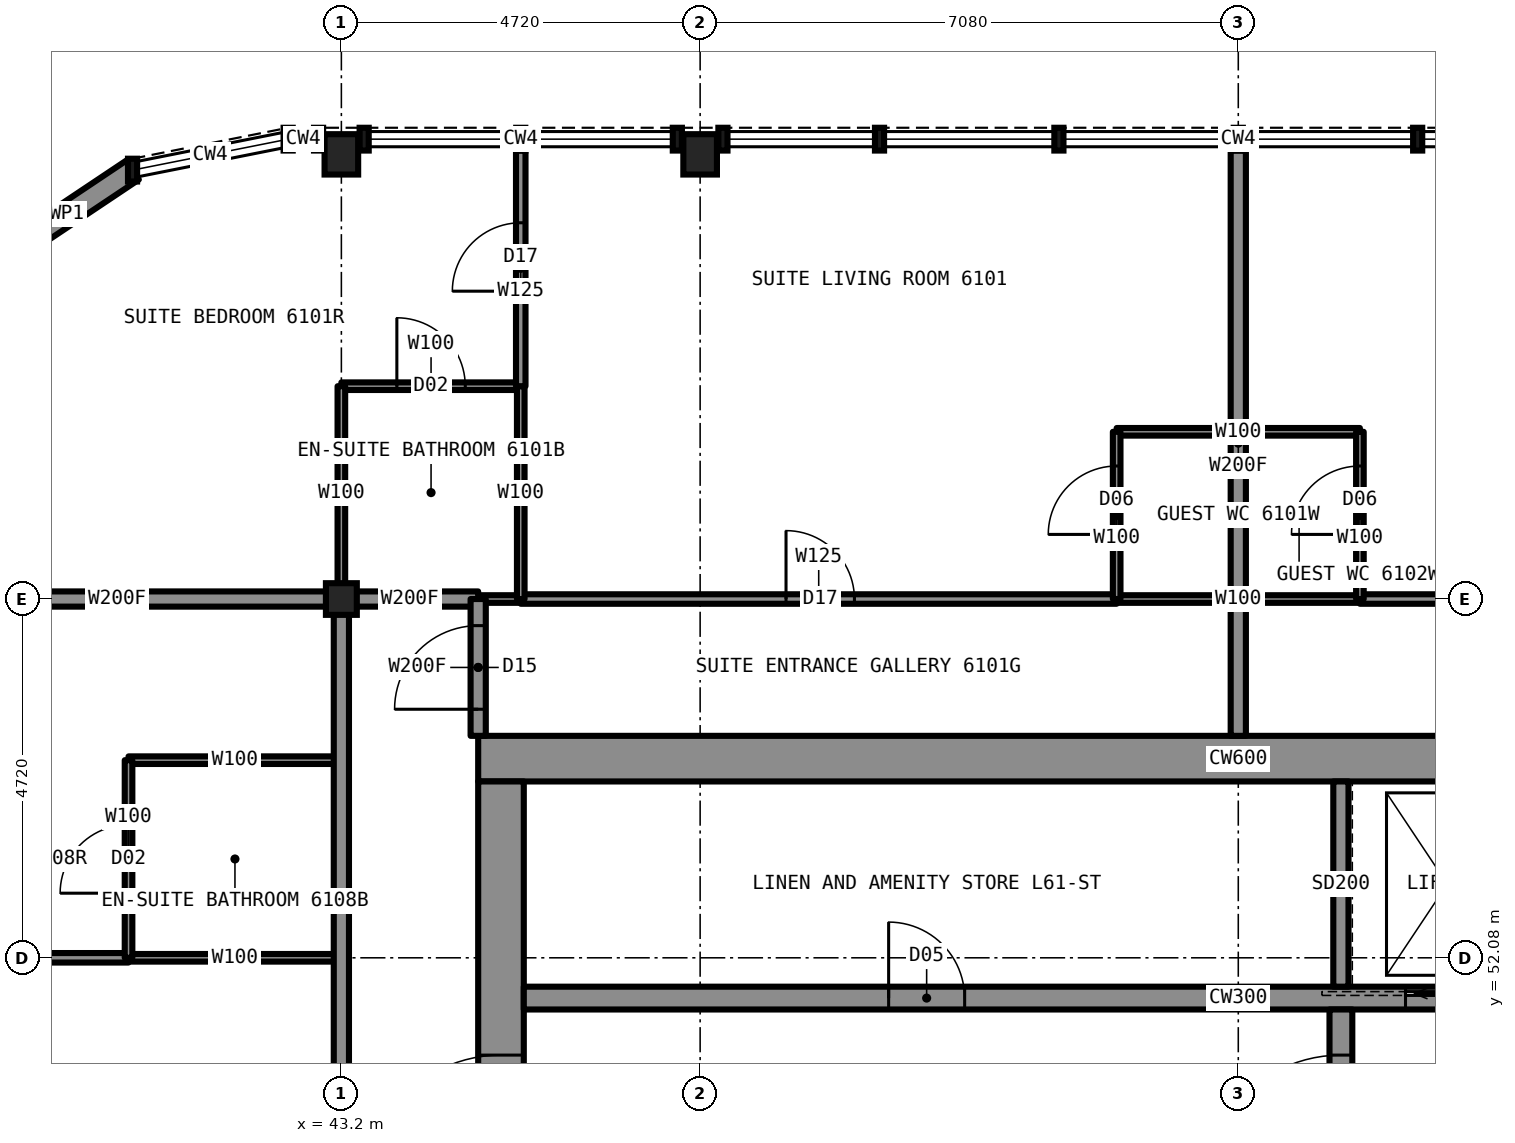
"""IFC4 building model, lengths in metres.
Left out: names, types, materials, properties, quantities, classifications, styles, units other than length and angle.
Written with IfcOpenShell. Run it as: python <this file> out.ifc"""

import sys

from ifc_helpers import new_model, si_unit, direction, frame, frame_2d, origin, origin_2d, place, context, subcontext, project, spatial, rectangle, i_section, extrude, element, fill, save


model = new_model("IFC4")
c1 = context("Model", 3, precision=1e-05, world=origin(), true_north=direction((0.0, 1.0)))
c2 = subcontext(c1, "Body", "Model", "MODEL_VIEW")
j1 = project(units=[si_unit("LENGTHUNIT", "METRE"), si_unit("PLANEANGLEUNIT", "RADIAN")], contexts=[c1])
p1 = place(None, origin())
s1 = spatial("IfcSite", under=j1, at=p1, CompositionType="ELEMENT")
p2 = place(p1, origin())
s2 = spatial("IfcBuilding", under=s1, at=p2, CompositionType="ELEMENT")
p3 = place(p2, frame((0.0, 0.0, 226.7)))
s3 = spatial("IfcBuildingStorey", under=s2, at=p3, CompositionType="ELEMENT", Elevation=226.7)
for number, where, z_axis, x_axis in (
    (1, (43.2, 62.65, 0.0), (0.0, 0.0, 1.0), (1.0, 0.0, 0.0)),
    (2, (47.92, 62.65, 0.0), (0.0, 0.0, 1.0), (1.0, 0.0, 0.0)),
):
    element("IfcColumn", number, at=place(p3, frame(where, z_axis=z_axis, x_axis=x_axis)), inside=s3, PredefinedType="COLUMN", context=c2, shape_type="SweptSolid", body=[
        extrude(i_section(OverallWidth=0.442, OverallDepth=0.531, WebThickness=0.066, FlangeThickness=0.106, at=origin_2d()), origin(), (0.0, 0.0, 1.0), 3.5),
    ])
p4 = place(p3, frame((43.2, 56.8, 0.0), z_axis=(0.0, 0.0, 1.0), x_axis=(1.0, 0.0, 0.0)))
e3 = element("IfcColumn", 3, at=p4, inside=s3, PredefinedType="COLUMN", context=c2, shape_type="SweptSolid", body=[
    extrude(i_section(OverallWidth=0.406, OverallDepth=0.417, WebThickness=0.03, FlangeThickness=0.048, at=origin_2d()), origin(), (0.0, 0.0, 1.0), 3.5),
])
p5 = place(p3, frame((45.0, 54.7, 0.0), z_axis=(0.0, 0.0, 1.0), x_axis=(1.0, 0.0, 0.0)))
e4 = element("IfcWall", 4, at=p5, inside=s3, PredefinedType="SHEAR", context=c2, shape_type="SweptSolid", body=[
    extrude(rectangle(XDim=20.0, YDim=0.6, at=frame_2d((10.0, 0.0))), origin(), (0.0, 0.0, 1.0), 3.5),
])
p6 = place(p3, frame((45.3, 35.6, 0.0), z_axis=(0.0, 0.0, 1.0), x_axis=(0.0, 1.0, 0.0)))
e5 = element("IfcWall", 5, at=p6, inside=s3, PredefinedType="SHEAR", context=c2, shape_type="SweptSolid", body=[
    extrude(rectangle(XDim=18.8, YDim=0.6, at=frame_2d((9.4, 0.0))), origin(), (0.0, 0.0, 1.0), 3.5),
])
p7 = place(p6, frame((13.4, 0.0, 0.0)))
e6 = element("IfcOpeningElement", 6, at=p7, cuts=e5, PredefinedType="OPENING", context=c2, shape_type="SweptSolid", body=[
    extrude(rectangle(XDim=1.8, YDim=2.2, at=frame_2d((0.9, 1.1))), frame((0.0, 0.31, 0.0), z_axis=(0.0, -1.0, 0.0), x_axis=(1.0, 0.0, 0.0)), (0.0, 0.0, 1.0), 0.62),
])
p8 = place(p6, frame((3.6, 0.0, 0.0)))
e7 = element("IfcOpeningElement", 7, at=p8, cuts=e5, PredefinedType="OPENING", context=c2, shape_type="SweptSolid", body=[
    extrude(rectangle(XDim=1.8, YDim=2.2, at=frame_2d((0.9, 1.1))), frame((0.0, 0.31, 0.0), z_axis=(0.0, -1.0, 0.0), x_axis=(1.0, 0.0, 0.0)), (0.0, 0.0, 1.0), 0.62),
])
p9 = place(p6, frame((6.4, 0.0, 0.0)))
e8 = element("IfcOpeningElement", 8, at=p9, cuts=e5, PredefinedType="OPENING", context=c2, shape_type="SweptSolid", body=[
    extrude(rectangle(XDim=1.2, YDim=2.2, at=frame_2d((0.6, 1.1))), frame((0.0, 0.31, 0.0), z_axis=(0.0, -1.0, 0.0), x_axis=(1.0, 0.0, 0.0)), (0.0, 0.0, 1.0), 0.62),
])
p10 = place(p3, frame((45.6, 51.55, 0.0), z_axis=(0.0, 0.0, 1.0), x_axis=(1.0, 0.0, 0.0)))
e9 = element("IfcWall", 9, at=p10, inside=s3, PredefinedType="SHEAR", context=c2, shape_type="SweptSolid", body=[
    extrude(rectangle(XDim=18.8, YDim=0.3, at=frame_2d((9.4, 0.0))), origin(), (0.0, 0.0, 1.0), 3.5),
])
p11 = place(p10, frame((4.8, 0.0, 0.0)))
e10 = element("IfcOpeningElement", 10, at=p11, cuts=e9, PredefinedType="OPENING", context=c2, shape_type="SweptSolid", body=[
    extrude(rectangle(XDim=1.0, YDim=2.1, at=frame_2d((0.5, 1.05))), frame((0.0, 0.16, 0.0), z_axis=(0.0, -1.0, 0.0), x_axis=(1.0, 0.0, 0.0)), (0.0, 0.0, 1.0), 0.32),
])
p12 = place(p10, frame((11.6, 0.0, 0.0)))
e11 = element("IfcOpeningElement", 11, at=p12, cuts=e9, PredefinedType="OPENING", context=c2, shape_type="SweptSolid", body=[
    extrude(rectangle(XDim=1.1, YDim=2.2, at=frame_2d((0.55, 1.1))), frame((0.0, 0.16, 0.0), z_axis=(0.0, -1.0, 0.0), x_axis=(1.0, 0.0, 0.0)), (0.0, 0.0, 1.0), 0.32),
])
p13 = place(p10, frame((14.3, 0.0, 0.0)))
e12 = element("IfcOpeningElement", 12, at=p13, cuts=e9, PredefinedType="OPENING", context=c2, shape_type="SweptSolid", body=[
    extrude(rectangle(XDim=1.1, YDim=2.2, at=frame_2d((0.55, 1.1))), frame((0.0, 0.16, 0.0), z_axis=(0.0, -1.0, 0.0), x_axis=(1.0, 0.0, 0.0)), (0.0, 0.0, 1.0), 0.32),
])
p14 = place(p3, frame((56.35, 41.9, 0.0), z_axis=(0.0, 0.0, 1.0), x_axis=(0.0, 1.0, 0.0)))
e13 = element("IfcWall", 13, at=p14, inside=s3, PredefinedType="SHEAR", context=c2, shape_type="SweptSolid", body=[
    extrude(rectangle(XDim=9.5, YDim=0.3, at=frame_2d((4.75, 0.0))), origin(), (0.0, 0.0, 1.0), 3.5),
])
p15 = place(p14, frame((7.1, 0.0, 0.0)))
e14 = element("IfcOpeningElement", 14, at=p15, cuts=e13, PredefinedType="OPENING", context=c2, shape_type="SweptSolid", body=[
    extrude(rectangle(XDim=1.8, YDim=2.2, at=frame_2d((0.9, 1.1))), frame((0.0, 0.16, 0.0), z_axis=(0.0, -1.0, 0.0), x_axis=(1.0, 0.0, 0.0)), (0.0, 0.0, 1.0), 0.32),
])
p16 = place(p3, frame((45.0, 56.8, 0.0), z_axis=(0.0, 0.0, 1.0), x_axis=(1.0, 0.0, 0.0)))
e15 = element("IfcWall", 15, at=p16, inside=s3, PredefinedType="PARTITIONING", context=c2, shape_type="SweptSolid", body=[
    extrude(rectangle(XDim=0.56, YDim=0.1, at=frame_2d((0.28, 0.0))), origin(), (0.0, 0.0, 1.0), 3.33),
])
p17 = place(p3, frame((53.4, 56.8, 0.0), z_axis=(0.0, 0.0, 1.0), x_axis=(1.0, 0.0, 0.0)))
e16 = element("IfcWall", 16, at=p17, inside=s3, PredefinedType="PARTITIONING", context=c2, shape_type="SweptSolid", body=[
    extrude(rectangle(XDim=3.2, YDim=0.1, at=frame_2d((1.6, 0.0))), origin(), (0.0, 0.0, 1.0), 3.33),
])
p18 = place(p3, frame((43.2, 56.8, 0.0), z_axis=(0.0, 0.0, 1.0), x_axis=(1.0, 0.0, 0.0)))
e17 = element("IfcWall", 17, at=p18, inside=s3, PredefinedType="PARTITIONING", context=c2, shape_type="SweptSolid", body=[
    extrude(rectangle(XDim=1.8, YDim=0.2, at=frame_2d((0.9, 0.0))), origin(), (0.0, 0.0, 1.0), 3.33),
])
p19 = place(p3, frame((37.3, 56.8, 0.0), z_axis=(0.0, 0.0, 1.0), x_axis=(1.0, 0.0, 0.0)))
e18 = element("IfcWall", 18, at=p19, inside=s3, PredefinedType="PARTITIONING", context=c2, shape_type="SweptSolid", body=[
    extrude(rectangle(XDim=5.9, YDim=0.2, at=frame_2d((2.95, 0.0))), origin(), (0.0, 0.0, 1.0), 2.573),
])
p20 = place(p3, frame((45.56, 56.8, 0.0), z_axis=(0.0, 0.0, 1.0), x_axis=(1.0, 0.0, 0.0)))
e19 = element("IfcWall", 19, at=p20, inside=s3, PredefinedType="PARTITIONING", context=c2, shape_type="SweptSolid", body=[
    extrude(rectangle(XDim=7.84, YDim=0.125, at=frame_2d((3.92, 0.0))), origin(), (0.0, 0.0, 1.0), 3.33),
])
p21 = place(p20, frame((3.49, 0.0, 0.0)))
e20 = element("IfcOpeningElement", 20, at=p21, cuts=e19, PredefinedType="OPENING", context=c2, shape_type="SweptSolid", body=[
    extrude(rectangle(XDim=0.9, YDim=2.2, at=frame_2d((0.45, 1.1))), frame((0.0, 0.073, 0.0), z_axis=(0.0, -1.0, 0.0), x_axis=(1.0, 0.0, 0.0)), (0.0, 0.0, 1.0), 0.145),
])
p22 = place(p3, frame((56.6, 56.8, 0.0), z_axis=(0.0, 0.0, 1.0), x_axis=(1.0, 0.0, 0.0)))
e21 = element("IfcWall", 21, at=p22, inside=s3, PredefinedType="PARTITIONING", context=c2, shape_type="SweptSolid", body=[
    extrude(rectangle(XDim=7.84, YDim=0.125, at=frame_2d((3.92, 0.0))), origin(), (0.0, 0.0, 1.0), 3.33),
])
p23 = place(p22, frame((3.45, 0.0, 0.0)))
e22 = element("IfcOpeningElement", 22, at=p23, cuts=e21, PredefinedType="OPENING", context=c2, shape_type="SweptSolid", body=[
    extrude(rectangle(XDim=0.9, YDim=2.2, at=frame_2d((0.45, 1.1))), frame((0.0, 0.073, 0.0), z_axis=(0.0, -1.0, 0.0), x_axis=(1.0, 0.0, 0.0)), (0.0, 0.0, 1.0), 0.145),
])
p24 = place(p3, frame((53.4, 59.0, 0.0), z_axis=(0.0, 0.0, 1.0), x_axis=(1.0, 0.0, 0.0)))
e23 = element("IfcWall", 23, at=p24, inside=s3, PredefinedType="PARTITIONING", context=c2, shape_type="SweptSolid", body=[
    extrude(rectangle(XDim=3.2, YDim=0.1, at=frame_2d((1.6, 0.0))), origin(), (0.0, 0.0, 1.0), 3.33),
])
p25 = place(p3, frame((43.2, 59.6, 0.0), z_axis=(0.0, 0.0, 1.0), x_axis=(1.0, 0.0, 0.0)))
e24 = element("IfcWall", 24, at=p25, inside=s3, PredefinedType="PARTITIONING", context=c2, shape_type="SweptSolid", body=[
    extrude(rectangle(XDim=2.36, YDim=0.1, at=frame_2d((1.18, 0.0))), origin(), (0.0, 0.0, 1.0), 3.33),
])
p26 = place(p25, frame((0.73, 0.0, 0.0)))
e25 = element("IfcOpeningElement", 25, at=p26, cuts=e24, PredefinedType="OPENING", context=c2, shape_type="SweptSolid", body=[
    extrude(rectangle(XDim=0.9, YDim=2.1, at=frame_2d((0.45, 1.05))), frame((0.0, 0.06, 0.0), z_axis=(0.0, -1.0, 0.0), x_axis=(1.0, 0.0, 0.0)), (0.0, 0.0, 1.0), 0.12),
])
p27 = place(p3, frame((40.4, 52.08, 0.0), z_axis=(0.0, 0.0, 1.0), x_axis=(1.0, 0.0, 0.0)))
e26 = element("IfcWall", 26, at=p27, inside=s3, PredefinedType="PARTITIONING", context=c2, shape_type="SweptSolid", body=[
    extrude(rectangle(XDim=2.8, YDim=0.1, at=frame_2d((1.4, 0.0))), origin(), (0.0, 0.0, 1.0), 2.573),
])
p28 = place(p3, frame((37.3, 52.08, 0.0), z_axis=(0.0, 0.0, 1.0), x_axis=(1.0, 0.0, 0.0)))
e27 = element("IfcWall", 27, at=p28, inside=s3, PredefinedType="PARTITIONING", context=c2, shape_type="SweptSolid", body=[
    extrude(rectangle(XDim=3.1, YDim=0.125, at=frame_2d((1.55, 0.0))), origin(), (0.0, 0.0, 1.0), 2.573),
])
p29 = place(p28, frame((0.95, 0.0, 0.0)))
e28 = element("IfcOpeningElement", 28, at=p29, cuts=e27, PredefinedType="OPENING", context=c2, shape_type="SweptSolid", body=[
    extrude(rectangle(XDim=0.9, YDim=2.2, at=frame_2d((0.45, 1.1))), frame((0.0, 0.073, 0.0), z_axis=(0.0, -1.0, 0.0), x_axis=(1.0, 0.0, 0.0)), (0.0, 0.0, 1.0), 0.145),
])
p30 = place(p3, frame((40.4, 54.68, 0.0), z_axis=(0.0, 0.0, 1.0), x_axis=(1.0, 0.0, 0.0)))
e29 = element("IfcWall", 29, at=p30, inside=s3, PredefinedType="PARTITIONING", context=c2, shape_type="SweptSolid", body=[
    extrude(rectangle(XDim=2.8, YDim=0.1, at=frame_2d((1.4, 0.0))), origin(), (0.0, 0.0, 1.0), 3.33),
])
p31 = place(p3, frame((53.4, 56.8, 0.0), z_axis=(0.0, 0.0, 1.0), x_axis=(0.0, 1.0, 0.0)))
e30 = element("IfcWall", 30, at=p31, inside=s3, PredefinedType="PARTITIONING", context=c2, shape_type="SweptSolid", body=[
    extrude(rectangle(XDim=2.2, YDim=0.1, at=frame_2d((1.1, 0.0))), origin(), (0.0, 0.0, 1.0), 3.33),
])
p32 = place(p31, frame((0.85, 0.0, 0.0)))
e31 = element("IfcOpeningElement", 31, at=p32, cuts=e30, PredefinedType="OPENING", context=c2, shape_type="SweptSolid", body=[
    extrude(rectangle(XDim=0.9, YDim=2.1, at=frame_2d((0.45, 1.05))), frame((0.0, 0.06, 0.0), z_axis=(0.0, -1.0, 0.0), x_axis=(1.0, 0.0, 0.0)), (0.0, 0.0, 1.0), 0.12),
])
p33 = place(p3, frame((45.0, 55.0, 0.0), z_axis=(0.0, 0.0, 1.0), x_axis=(0.0, 1.0, 0.0)))
e32 = element("IfcWall", 32, at=p33, inside=s3, PredefinedType="PARTITIONING", context=c2, shape_type="SweptSolid", body=[
    extrude(rectangle(XDim=1.8, YDim=0.2, at=frame_2d((0.9, 0.0))), origin(), (0.0, 0.0, 1.0), 3.33),
])
p34 = place(p33, frame((0.35, 0.0, 0.0)))
e33 = element("IfcOpeningElement", 33, at=p34, cuts=e32, PredefinedType="OPENING", context=c2, shape_type="SweptSolid", body=[
    extrude(rectangle(XDim=1.1, YDim=2.2, at=frame_2d((0.55, 1.1))), frame((0.0, 0.11, 0.0), z_axis=(0.0, -1.0, 0.0), x_axis=(1.0, 0.0, 0.0)), (0.0, 0.0, 1.0), 0.22),
])
p35 = place(p3, frame((43.2, 56.8, 0.0), z_axis=(0.0, 0.0, 1.0), x_axis=(0.0, 1.0, 0.0)))
e34 = element("IfcWall", 34, at=p35, inside=s3, PredefinedType="PARTITIONING", context=c2, shape_type="SweptSolid", body=[
    extrude(rectangle(XDim=2.8, YDim=0.1, at=frame_2d((1.4, 0.0))), origin(), (0.0, 0.0, 1.0), 2.573),
])
p36 = place(p3, frame((43.2, 33.2, 0.0), z_axis=(0.0, 0.0, 1.0), x_axis=(0.0, 1.0, 0.0)))
e35 = element("IfcWall", 35, at=p36, inside=s3, PredefinedType="PARTITIONING", context=c2, shape_type="SweptSolid", body=[
    extrude(rectangle(XDim=23.6, YDim=0.2, at=frame_2d((11.8, 0.0))), origin(), (0.0, 0.0, 1.0), 3.33),
])
p37 = place(p36, frame((8.85, 0.0, 0.0)))
e36 = element("IfcOpeningElement", 36, at=p37, cuts=e35, PredefinedType="OPENING", context=c2, shape_type="SweptSolid", body=[
    extrude(rectangle(XDim=1.1, YDim=2.2, at=frame_2d((0.55, 1.1))), frame((0.0, 0.11, 0.0), z_axis=(0.0, -1.0, 0.0), x_axis=(1.0, 0.0, 0.0)), (0.0, 0.0, 1.0), 0.22),
])
p38 = place(p36, frame((13.65, 0.0, 0.0)))
e37 = element("IfcOpeningElement", 37, at=p38, cuts=e35, PredefinedType="OPENING", context=c2, shape_type="SweptSolid", body=[
    extrude(rectangle(XDim=1.1, YDim=2.2, at=frame_2d((0.55, 1.1))), frame((0.0, 0.11, 0.0), z_axis=(0.0, -1.0, 0.0), x_axis=(1.0, 0.0, 0.0)), (0.0, 0.0, 1.0), 0.22),
])
p39 = place(p3, frame((40.4, 52.08, 0.0), z_axis=(0.0, 0.0, 1.0), x_axis=(0.0, 1.0, 0.0)))
e38 = element("IfcWall", 38, at=p39, inside=s3, PredefinedType="PARTITIONING", context=c2, shape_type="SweptSolid", body=[
    extrude(rectangle(XDim=2.6, YDim=0.1, at=frame_2d((1.3, 0.0))), origin(), (0.0, 0.0, 1.0), 3.33),
])
p40 = place(p39, frame((0.85, 0.0, 0.0)))
e39 = element("IfcOpeningElement", 39, at=p40, cuts=e38, PredefinedType="OPENING", context=c2, shape_type="SweptSolid", body=[
    extrude(rectangle(XDim=0.9, YDim=2.1, at=frame_2d((0.45, 1.05))), frame((0.0, 0.06, 0.0), z_axis=(0.0, -1.0, 0.0), x_axis=(1.0, 0.0, 0.0)), (0.0, 0.0, 1.0), 0.12),
])
p41 = place(p3, frame((45.56, 56.8, 0.0), z_axis=(0.0, 0.0, 1.0), x_axis=(0.0, 1.0, 0.0)))
e40 = element("IfcWall", 40, at=p41, inside=s3, PredefinedType="PARTITIONING", context=c2, shape_type="SweptSolid", body=[
    extrude(rectangle(XDim=2.8, YDim=0.1, at=frame_2d((1.4, 0.0))), origin(), (0.0, 0.0, 1.0), 3.33),
])
p42 = place(p3, frame((45.56, 59.6, 0.0), z_axis=(0.0, 0.0, 1.0), x_axis=(0.0, 1.0, 0.0)))
e41 = element("IfcWall", 41, at=p42, inside=s3, PredefinedType="PARTITIONING", context=c2, shape_type="SweptSolid", body=[
    extrude(rectangle(XDim=3.1, YDim=0.125, at=frame_2d((1.55, 0.0))), origin(), (0.0, 0.0, 1.0), 3.33),
])
p43 = place(p42, frame((1.25, 0.0, 0.0)))
e42 = element("IfcOpeningElement", 42, at=p43, cuts=e41, PredefinedType="OPENING", context=c2, shape_type="SweptSolid", body=[
    extrude(rectangle(XDim=0.9, YDim=2.2, at=frame_2d((0.45, 1.1))), frame((0.0, 0.073, 0.0), z_axis=(0.0, -1.0, 0.0), x_axis=(1.0, 0.0, 0.0)), (0.0, 0.0, 1.0), 0.145),
])
p44 = place(p3, frame((55.0, 55.0, 0.0), z_axis=(0.0, 0.0, 1.0), x_axis=(0.0, 1.0, 0.0)))
e43 = element("IfcWall", 43, at=p44, inside=s3, PredefinedType="PARTITIONING", context=c2, shape_type="SweptSolid", body=[
    extrude(rectangle(XDim=7.7, YDim=0.2, at=frame_2d((3.85, 0.0))), origin(), (0.0, 0.0, 1.0), 2.573),
])
p45 = place(p3, frame((56.6, 56.8, 0.0), z_axis=(0.0, 0.0, 1.0), x_axis=(0.0, 1.0, 0.0)))
e44 = element("IfcWall", 44, at=p45, inside=s3, PredefinedType="PARTITIONING", context=c2, shape_type="SweptSolid", body=[
    extrude(rectangle(XDim=2.2, YDim=0.1, at=frame_2d((1.1, 0.0))), origin(), (0.0, 0.0, 1.0), 3.33),
])
p46 = place(p45, frame((0.85, 0.0, 0.0)))
e45 = element("IfcOpeningElement", 45, at=p46, cuts=e44, PredefinedType="OPENING", context=c2, shape_type="SweptSolid", body=[
    extrude(rectangle(XDim=0.9, YDim=2.1, at=frame_2d((0.45, 1.05))), frame((0.0, 0.06, 0.0), z_axis=(0.0, -1.0, 0.0), x_axis=(1.0, 0.0, 0.0)), (0.0, 0.0, 1.0), 0.12),
])
p47 = place(p3, frame((56.35, 51.7, 0.0), z_axis=(0.0, 0.0, 1.0), x_axis=(0.0, 1.0, 0.0)))
e46 = element("IfcWall", 46, at=p47, inside=s3, PredefinedType="PARTITIONING", context=c2, shape_type="SweptSolid", body=[
    extrude(rectangle(XDim=2.7, YDim=0.2, at=frame_2d((1.35, 0.0))), origin(), (0.0, 0.0, 1.0), 3.33),
])
p48 = place(p3, frame((40.453, 62.443, 0.0), z_axis=(0.0, 0.0, 1.0), x_axis=(-0.831420010345, -0.555644460423, 0.0)))
e47 = element("IfcWall", 47, at=p48, inside=s3, PredefinedType="SOLIDWALL", context=c2, shape_type="SweptSolid", body=[
    extrude(rectangle(XDim=2.087, YDim=0.3, at=frame_2d((1.044, 0.0))), origin(), (0.0, 0.0, 1.0), 2.83),
])
p49 = place(p21, origin())
e48 = element("IfcDoor", 48, at=p49, inside=s3, OperationType="SINGLE_SWING_LEFT", PredefinedType="DOOR", context=c2, shape_type="SweptSolid", body=[
    extrude(rectangle(XDim=0.9, YDim=2.2, at=frame_2d((0.45, 1.1))), frame((0.0, 0.025, 0.0), z_axis=(0.0, -1.0, 0.0), x_axis=(1.0, 0.0, 0.0)), (0.0, 0.0, 1.0), 0.05),
])
fill(e20, e48)
p50 = place(p26, origin())
e49 = element("IfcDoor", 49, at=p50, inside=s3, OperationType="SINGLE_SWING_RIGHT", PredefinedType="DOOR", context=c2, shape_type="SweptSolid", body=[
    extrude(rectangle(XDim=0.9, YDim=2.1, at=frame_2d((0.45, 1.05))), frame((0.0, 0.025, 0.0), z_axis=(0.0, -1.0, 0.0), x_axis=(1.0, 0.0, 0.0)), (0.0, 0.0, 1.0), 0.05),
])
fill(e25, e49)
p51 = place(p34, origin())
e50 = element("IfcDoor", 50, at=p51, inside=s3, OperationType="SINGLE_SWING_LEFT", PredefinedType="DOOR", context=c2, shape_type="SweptSolid", body=[
    extrude(rectangle(XDim=1.1, YDim=2.2, at=frame_2d((0.55, 1.1))), frame((0.0, 0.025, 0.0), z_axis=(0.0, -1.0, 0.0), x_axis=(1.0, 0.0, 0.0)), (0.0, 0.0, 1.0), 0.05),
])
fill(e33, e50)
p52 = place(p43, origin())
e51 = element("IfcDoor", 51, at=p52, inside=s3, OperationType="SINGLE_SWING_LEFT", PredefinedType="DOOR", context=c2, shape_type="SweptSolid", body=[
    extrude(rectangle(XDim=0.9, YDim=2.2, at=frame_2d((0.45, 1.1))), frame((0.0, 0.025, 0.0), z_axis=(0.0, -1.0, 0.0), x_axis=(1.0, 0.0, 0.0)), (0.0, 0.0, 1.0), 0.05),
])
fill(e42, e51)
p53 = place(p32, origin())
e52 = element("IfcDoor", 52, at=p53, inside=s3, OperationType="SINGLE_SWING_LEFT", PredefinedType="DOOR", context=c2, shape_type="SweptSolid", body=[
    extrude(rectangle(XDim=0.9, YDim=2.1, at=frame_2d((0.45, 1.05))), frame((0.0, 0.025, 0.0), z_axis=(0.0, -1.0, 0.0), x_axis=(1.0, 0.0, 0.0)), (0.0, 0.0, 1.0), 0.05),
])
fill(e31, e52)
p54 = place(p46, origin())
e53 = element("IfcDoor", 53, at=p54, inside=s3, OperationType="SINGLE_SWING_LEFT", PredefinedType="DOOR", context=c2, shape_type="SweptSolid", body=[
    extrude(rectangle(XDim=0.9, YDim=2.1, at=frame_2d((0.45, 1.05))), frame((0.0, 0.025, 0.0), z_axis=(0.0, -1.0, 0.0), x_axis=(1.0, 0.0, 0.0)), (0.0, 0.0, 1.0), 0.05),
])
fill(e45, e53)
p55 = place(p40, origin())
e54 = element("IfcDoor", 54, at=p55, inside=s3, OperationType="SINGLE_SWING_RIGHT", PredefinedType="DOOR", context=c2, shape_type="SweptSolid", body=[
    extrude(rectangle(XDim=0.9, YDim=2.1, at=frame_2d((0.45, 1.05))), frame((0.0, 0.025, 0.0), z_axis=(0.0, -1.0, 0.0), x_axis=(1.0, 0.0, 0.0)), (0.0, 0.0, 1.0), 0.05),
])
fill(e39, e54)
p56 = place(p7, origin())
e55 = element("IfcDoor", 55, at=p56, inside=s3, OperationType="DOUBLE_DOOR_SINGLE_SWING", PredefinedType="DOOR", context=c2, shape_type="SweptSolid", body=[
    extrude(rectangle(XDim=1.8, YDim=2.2, at=frame_2d((0.9, 1.1))), frame((0.0, 0.025, 0.0), z_axis=(0.0, -1.0, 0.0), x_axis=(1.0, 0.0, 0.0)), (0.0, 0.0, 1.0), 0.05),
])
fill(e6, e55)
p57 = place(p15, origin())
e56 = element("IfcDoor", 56, at=p57, inside=s3, OperationType="DOUBLE_DOOR_SINGLE_SWING", PredefinedType="DOOR", context=c2, shape_type="SweptSolid", body=[
    extrude(rectangle(XDim=1.8, YDim=2.2, at=frame_2d((0.9, 1.1))), frame((0.0, 0.025, 0.0), z_axis=(0.0, -1.0, 0.0), x_axis=(1.0, 0.0, 0.0)), (0.0, 0.0, 1.0), 0.05),
])
fill(e14, e56)
p58 = place(p11, origin())
e57 = element("IfcDoor", 57, at=p58, inside=s3, OperationType="SINGLE_SWING_LEFT", PredefinedType="DOOR", context=c2, shape_type="SweptSolid", body=[
    extrude(rectangle(XDim=1.0, YDim=2.1, at=frame_2d((0.5, 1.05))), frame((0.0, 0.025, 0.0), z_axis=(0.0, -1.0, 0.0), x_axis=(1.0, 0.0, 0.0)), (0.0, 0.0, 1.0), 0.05),
])
fill(e10, e57)
p59 = place(p12, origin())
e58 = element("IfcDoor", 58, at=p59, inside=s3, OperationType="SLIDING_TO_LEFT", PredefinedType="DOOR", context=c2, shape_type="SweptSolid", body=[
    extrude(rectangle(XDim=1.1, YDim=2.2, at=frame_2d((0.55, 1.1))), frame((0.0, 0.025, 0.0), z_axis=(0.0, -1.0, 0.0), x_axis=(1.0, 0.0, 0.0)), (0.0, 0.0, 1.0), 0.05),
])
fill(e11, e58)
save(model, sys.argv[1])
